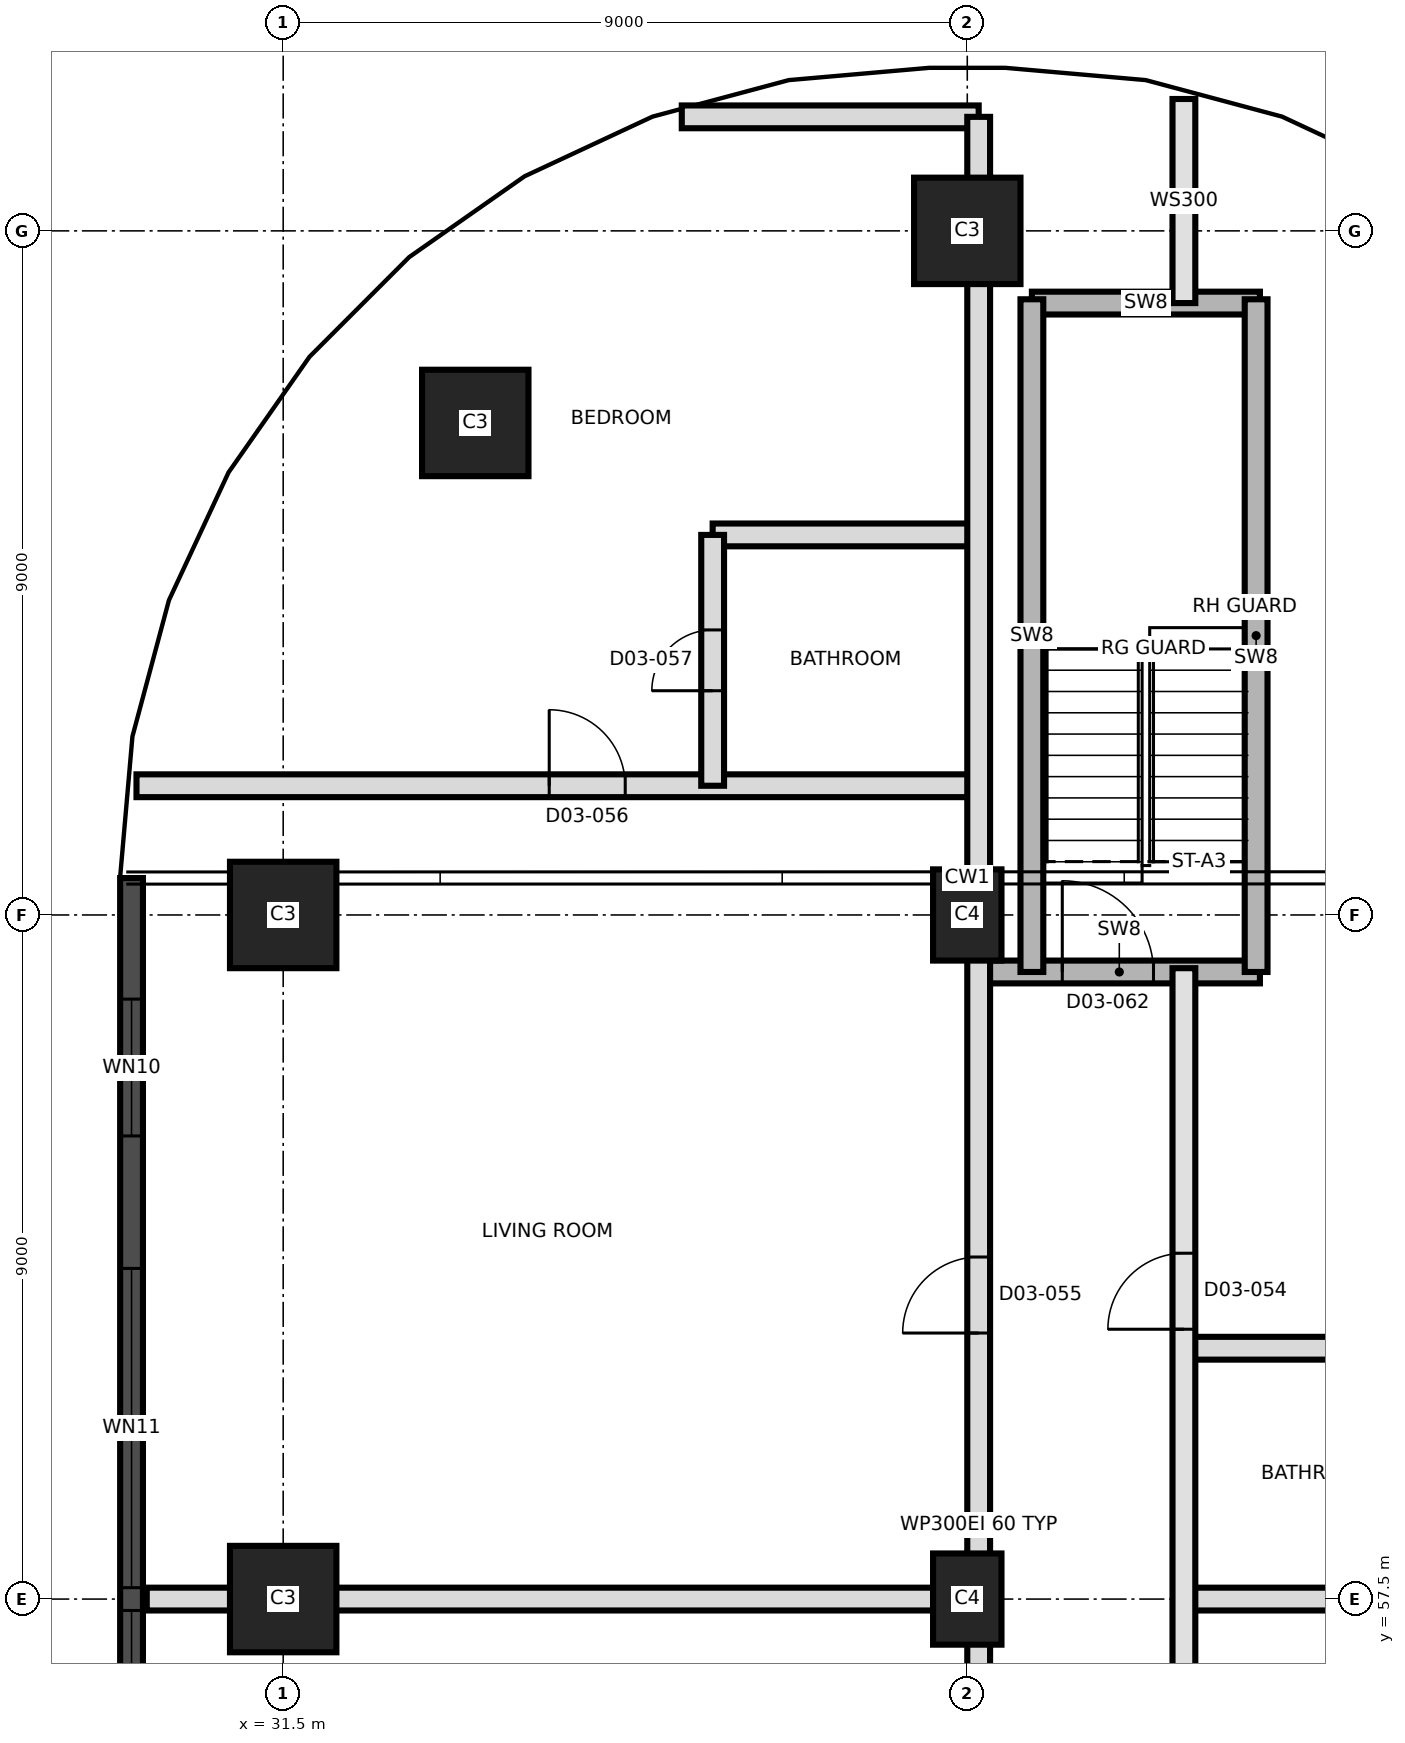
"""IFC4 building model, lengths in metres.
Left out: names, types, materials, properties, quantities, classifications, styles, units other than length and angle.
Written with IfcOpenShell. Run it as: python <this file> out.ifc"""

import sys

from ifc_helpers import new_model, si_unit, direction, frame, frame_2d, origin, origin_2d, place, context, subcontext, project, spatial, rectangle, extrude, element, fill, save


model = new_model("IFC4")
c1 = context("Model", 3, precision=1e-05, world=origin(), true_north=direction((0.0, 1.0)))
c2 = subcontext(c1, "Body", "Model", "MODEL_VIEW")
j1 = project(units=[si_unit("LENGTHUNIT", "METRE"), si_unit("PLANEANGLEUNIT", "RADIAN")], contexts=[c1])
p1 = place(None, origin())
s1 = spatial("IfcSite", under=j1, at=p1, CompositionType="ELEMENT")
p2 = place(p1, origin())
s2 = spatial("IfcBuilding", under=s1, at=p2, CompositionType="ELEMENT")
p3 = place(p2, frame((0.0, 0.0, 55.7)))
s3 = spatial("IfcBuildingStorey", under=s2, at=p3, CompositionType="ELEMENT", Elevation=55.7)
p4 = place(p3, frame((31.5, 57.5, 0.0), z_axis=(0.0, 0.0, 1.0), x_axis=(1.0, 0.0, 0.0)))
e1 = element("IfcColumn", 1, at=p4, inside=s3, PredefinedType="COLUMN", context=c2, shape_type="SweptSolid", body=[
    extrude(rectangle(XDim=1.4, YDim=1.4, at=origin_2d()), origin(), (0.0, 0.0, 1.0), 3.7),
])
p5 = place(p3, frame((40.5, 57.5, 0.0), z_axis=(0.0, 0.0, 1.0), x_axis=(0.0, 1.0, 0.0)))
e2 = element("IfcColumn", 2, at=p5, inside=s3, PredefinedType="COLUMN", context=c2, shape_type="SweptSolid", body=[
    extrude(rectangle(XDim=1.2, YDim=0.9, at=origin_2d()), origin(), (0.0, 0.0, 1.0), 3.7),
])
p6 = place(p3, frame((31.5, 66.5, 0.0), z_axis=(0.0, 0.0, 1.0), x_axis=(1.0, 0.0, 0.0)))
e3 = element("IfcColumn", 3, at=p6, inside=s3, PredefinedType="COLUMN", context=c2, shape_type="SweptSolid", body=[
    extrude(rectangle(XDim=1.4, YDim=1.4, at=origin_2d()), origin(), (0.0, 0.0, 1.0), 3.7),
])
p7 = place(p3, frame((40.5, 66.5, 0.0), z_axis=(0.0, 0.0, 1.0), x_axis=(0.0, 1.0, 0.0)))
e4 = element("IfcColumn", 4, at=p7, inside=s3, PredefinedType="COLUMN", context=c2, shape_type="SweptSolid", body=[
    extrude(rectangle(XDim=1.2, YDim=0.9, at=origin_2d()), origin(), (0.0, 0.0, 1.0), 3.7),
])
for number, where, z_axis, x_axis in (
    (5, (34.027, 72.973, 0.0), (0.0, 0.0, 1.0), (1.0, 0.0, 0.0)),
    (6, (40.5, 75.5, 0.0), (0.0, 0.0, 1.0), (1.0, 0.0, 0.0)),
):
    element("IfcColumn", number, at=place(p3, frame(where, z_axis=z_axis, x_axis=x_axis)), inside=s3, PredefinedType="COLUMN", context=c2, shape_type="SweptSolid", body=[
        extrude(rectangle(XDim=1.4, YDim=1.4, at=origin_2d()), origin(), (0.0, 0.0, 1.0), 3.7),
    ])
p8 = place(p3, frame((29.505, 66.986, 0.0), z_axis=(0.0, 0.0, 1.0), x_axis=(0.0, -1.0, 0.0)))
e7 = element("IfcWall", 7, at=p8, inside=s3, PredefinedType="SOLIDWALL", context=c2, shape_type="SweptSolid", body=[
    extrude(rectangle(XDim=32.976, YDim=0.3, at=frame_2d((16.488, 0.0))), origin(), (0.0, 0.0, 1.0), 3.4),
])
p9 = place(p8, frame((1.593, 0.0, 0.3)))
e8 = element("IfcOpeningElement", 8, at=p9, cuts=e7, PredefinedType="OPENING", context=c2, shape_type="SweptSolid", body=[
    extrude(rectangle(XDim=1.8, YDim=2.4, at=frame_2d((0.9, 1.2))), frame((0.0, 0.16, 0.0), z_axis=(0.0, -1.0, 0.0), x_axis=(1.0, 0.0, 0.0)), (0.0, 0.0, 1.0), 0.32),
])
p10 = place(p8, frame((5.136, 0.0, 0.9)))
e9 = element("IfcOpeningElement", 9, at=p10, cuts=e7, PredefinedType="OPENING", context=c2, shape_type="SweptSolid", body=[
    extrude(rectangle(XDim=4.2, YDim=1.5, at=frame_2d((2.1, 0.75))), frame((0.0, 0.16, 0.0), z_axis=(0.0, -1.0, 0.0), x_axis=(1.0, 0.0, 0.0)), (0.0, 0.0, 1.0), 0.32),
])
p11 = place(p8, frame((9.636, 0.0, 0.9)))
e10 = element("IfcOpeningElement", 10, at=p11, cuts=e7, PredefinedType="OPENING", context=c2, shape_type="SweptSolid", body=[
    extrude(rectangle(XDim=4.2, YDim=1.5, at=frame_2d((2.1, 0.75))), frame((0.0, 0.16, 0.0), z_axis=(0.0, -1.0, 0.0), x_axis=(1.0, 0.0, 0.0)), (0.0, 0.0, 1.0), 0.32),
])
p12 = place(p8, frame((14.136, 0.0, 0.9)))
e11 = element("IfcOpeningElement", 11, at=p12, cuts=e7, PredefinedType="OPENING", context=c2, shape_type="SweptSolid", body=[
    extrude(rectangle(XDim=4.2, YDim=1.5, at=frame_2d((2.1, 0.75))), frame((0.0, 0.16, 0.0), z_axis=(0.0, -1.0, 0.0), x_axis=(1.0, 0.0, 0.0)), (0.0, 0.0, 1.0), 0.32),
])
p13 = place(p8, frame((18.636, 0.0, 0.9)))
e12 = element("IfcOpeningElement", 12, at=p13, cuts=e7, PredefinedType="OPENING", context=c2, shape_type="SweptSolid", body=[
    extrude(rectangle(XDim=4.2, YDim=1.5, at=frame_2d((2.1, 0.75))), frame((0.0, 0.16, 0.0), z_axis=(0.0, -1.0, 0.0), x_axis=(1.0, 0.0, 0.0)), (0.0, 0.0, 1.0), 0.32),
])
p14 = place(p8, frame((23.136, 0.0, 0.9)))
e13 = element("IfcOpeningElement", 13, at=p14, cuts=e7, PredefinedType="OPENING", context=c2, shape_type="SweptSolid", body=[
    extrude(rectangle(XDim=4.2, YDim=1.5, at=frame_2d((2.1, 0.75))), frame((0.0, 0.16, 0.0), z_axis=(0.0, -1.0, 0.0), x_axis=(1.0, 0.0, 0.0)), (0.0, 0.0, 1.0), 0.32),
])
p15 = place(p8, frame((29.331, 0.0, 0.3)))
e14 = element("IfcOpeningElement", 14, at=p15, cuts=e7, PredefinedType="OPENING", context=c2, shape_type="SweptSolid", body=[
    extrude(rectangle(XDim=1.8, YDim=2.4, at=frame_2d((0.9, 1.2))), frame((0.0, 0.16, 0.0), z_axis=(0.0, -1.0, 0.0), x_axis=(1.0, 0.0, 0.0)), (0.0, 0.0, 1.0), 0.32),
])
p16 = place(p3, frame((29.705, 57.5, 0.0), z_axis=(0.0, 0.0, 1.0), x_axis=(1.0, 0.0, 0.0)))
e15 = element("IfcWall", 15, at=p16, inside=s3, PredefinedType="PARTITIONING", context=c2, shape_type="SweptSolid", body=[
    extrude(rectangle(XDim=10.945, YDim=0.3, at=frame_2d((5.472, 0.0))), origin(), (0.0, 0.0, 1.0), 3.4),
])
p17 = place(p3, frame((43.35, 57.5, 0.0), z_axis=(0.0, 0.0, 1.0), x_axis=(1.0, 0.0, 0.0)))
e16 = element("IfcWall", 16, at=p17, inside=s3, PredefinedType="PARTITIONING", context=c2, shape_type="SweptSolid", body=[
    extrude(rectangle(XDim=8.125, YDim=0.3, at=frame_2d((4.062, 0.0))), origin(), (0.0, 0.0, 1.0), 3.4),
])
p18 = place(p3, frame((43.35, 60.8, 0.0), z_axis=(0.0, 0.0, 1.0), x_axis=(1.0, 0.0, 0.0)))
e17 = element("IfcWall", 17, at=p18, inside=s3, PredefinedType="PARTITIONING", context=c2, shape_type="SweptSolid", body=[
    extrude(rectangle(XDim=3.5, YDim=0.3, at=frame_2d((1.75, 0.0))), origin(), (0.0, 0.0, 1.0), 3.4),
])
p19 = place(p3, frame((40.65, 65.75, 0.0), z_axis=(0.0, 0.0, 1.0), x_axis=(1.0, 0.0, 0.0)))
e18 = element("IfcWall", 18, at=p19, inside=s3, PredefinedType="SHEAR", context=c2, shape_type="SweptSolid", body=[
    extrude(rectangle(XDim=3.7, YDim=0.3, at=frame_2d((1.85, 0.0))), origin(), (0.0, 0.0, 1.0), 3.4),
])
p20 = place(p19, frame((1.1, 0.0, 0.0)))
e19 = element("IfcOpeningElement", 19, at=p20, cuts=e18, PredefinedType="OPENING", context=c2, shape_type="SweptSolid", body=[
    extrude(rectangle(XDim=1.2, YDim=2.1, at=frame_2d((0.6, 1.05))), frame((0.0, 0.16, 0.0), z_axis=(0.0, -1.0, 0.0), x_axis=(1.0, 0.0, 0.0)), (0.0, 0.0, 1.0), 0.32),
])
p21 = place(p3, frame((29.57, 68.2, 0.0), z_axis=(0.0, 0.0, 1.0), x_axis=(1.0, 0.0, 0.0)))
e20 = element("IfcWall", 20, at=p21, inside=s3, PredefinedType="PARTITIONING", context=c2, shape_type="SweptSolid", body=[
    extrude(rectangle(XDim=11.08, YDim=0.3, at=frame_2d((5.54, 0.0))), origin(), (0.0, 0.0, 1.0), 3.4),
])
p22 = place(p21, frame((5.43, 0.0, 0.0)))
e21 = element("IfcOpeningElement", 21, at=p22, cuts=e20, PredefinedType="OPENING", context=c2, shape_type="SweptSolid", body=[
    extrude(rectangle(XDim=1.0, YDim=2.1, at=frame_2d((0.5, 1.05))), frame((0.0, 0.16, 0.0), z_axis=(0.0, -1.0, 0.0), x_axis=(1.0, 0.0, 0.0)), (0.0, 0.0, 1.0), 0.32),
])
p23 = place(p3, frame((37.15, 71.5, 0.0), z_axis=(0.0, 0.0, 1.0), x_axis=(1.0, 0.0, 0.0)))
e22 = element("IfcWall", 22, at=p23, inside=s3, PredefinedType="PARTITIONING", context=c2, shape_type="SweptSolid", body=[
    extrude(rectangle(XDim=3.5, YDim=0.3, at=frame_2d((1.75, 0.0))), origin(), (0.0, 0.0, 1.0), 3.4),
])
p24 = place(p3, frame((41.35, 74.55, 0.0), z_axis=(0.0, 0.0, 1.0), x_axis=(1.0, 0.0, 0.0)))
e23 = element("IfcWall", 23, at=p24, inside=s3, PredefinedType="SHEAR", context=c2, shape_type="SweptSolid", body=[
    extrude(rectangle(XDim=3.0, YDim=0.3, at=frame_2d((1.5, 0.0))), origin(), (0.0, 0.0, 1.0), 3.4),
])
p25 = place(p3, frame((36.744, 77.0, 0.0), z_axis=(0.0, 0.0, 1.0), x_axis=(1.0, 0.0, 0.0)))
e24 = element("IfcWall", 24, at=p25, inside=s3, PredefinedType="PARTITIONING", context=c2, shape_type="SweptSolid", body=[
    extrude(rectangle(XDim=3.906, YDim=0.3, at=frame_2d((1.953, 0.0))), origin(), (0.0, 0.0, 1.0), 3.4),
])
p26 = place(p3, frame((37.15, 68.2, 0.0), z_axis=(0.0, 0.0, 1.0), x_axis=(0.0, 1.0, 0.0)))
e25 = element("IfcWall", 25, at=p26, inside=s3, PredefinedType="PARTITIONING", context=c2, shape_type="SweptSolid", body=[
    extrude(rectangle(XDim=3.3, YDim=0.3, at=frame_2d((1.65, 0.0))), origin(), (0.0, 0.0, 1.0), 3.4),
])
p27 = place(p26, frame((1.25, 0.0, 0.0)))
e26 = element("IfcOpeningElement", 26, at=p27, cuts=e25, PredefinedType="OPENING", context=c2, shape_type="SweptSolid", body=[
    extrude(rectangle(XDim=0.8, YDim=2.1, at=frame_2d((0.4, 1.05))), frame((0.0, 0.16, 0.0), z_axis=(0.0, -1.0, 0.0), x_axis=(1.0, 0.0, 0.0)), (0.0, 0.0, 1.0), 0.32),
])
p28 = place(p3, frame((40.65, 39.95, 0.0), z_axis=(0.0, 0.0, 1.0), x_axis=(0.0, 1.0, 0.0)))
e27 = element("IfcWall", 27, at=p28, inside=s3, PredefinedType="PARTITIONING", context=c2, shape_type="SweptSolid", body=[
    extrude(rectangle(XDim=37.05, YDim=0.3, at=frame_2d((18.525, 0.0))), origin(), (0.0, 0.0, 1.0), 3.4),
])
p29 = place(p28, frame((1.9, 0.0, 0.0)))
e28 = element("IfcOpeningElement", 28, at=p29, cuts=e27, PredefinedType="OPENING", context=c2, shape_type="SweptSolid", body=[
    extrude(rectangle(XDim=1.0, YDim=2.4, at=frame_2d((0.5, 1.2))), frame((0.0, 0.16, 0.0), z_axis=(0.0, -1.0, 0.0), x_axis=(1.0, 0.0, 0.0)), (0.0, 0.0, 1.0), 0.32),
])
p30 = place(p28, frame((14.2, 0.0, 0.0)))
e29 = element("IfcOpeningElement", 29, at=p30, cuts=e27, PredefinedType="OPENING", context=c2, shape_type="SweptSolid", body=[
    extrude(rectangle(XDim=1.0, YDim=2.4, at=frame_2d((0.5, 1.2))), frame((0.0, 0.16, 0.0), z_axis=(0.0, -1.0, 0.0), x_axis=(1.0, 0.0, 0.0)), (0.0, 0.0, 1.0), 0.32),
])
p31 = place(p28, frame((21.05, 0.0, 0.0)))
e30 = element("IfcOpeningElement", 30, at=p31, cuts=e27, PredefinedType="OPENING", context=c2, shape_type="SweptSolid", body=[
    extrude(rectangle(XDim=1.0, YDim=2.4, at=frame_2d((0.5, 1.2))), frame((0.0, 0.16, 0.0), z_axis=(0.0, -1.0, 0.0), x_axis=(1.0, 0.0, 0.0)), (0.0, 0.0, 1.0), 0.32),
])
p32 = place(p3, frame((41.35, 65.75, 0.0), z_axis=(0.0, 0.0, 1.0), x_axis=(0.0, 1.0, 0.0)))
e31 = element("IfcWall", 31, at=p32, inside=s3, PredefinedType="SHEAR", context=c2, shape_type="SweptSolid", body=[
    extrude(rectangle(XDim=8.85, YDim=0.3, at=frame_2d((4.425, 0.0))), origin(), (0.0, 0.0, 1.0), 3.4),
])
p33 = place(p3, frame((43.35, 39.95, 0.0), z_axis=(0.0, 0.0, 1.0), x_axis=(0.0, 1.0, 0.0)))
e32 = element("IfcWall", 32, at=p33, inside=s3, PredefinedType="SOLIDWALL", context=c2, shape_type="SweptSolid", body=[
    extrude(rectangle(XDim=25.85, YDim=0.3, at=frame_2d((12.925, 0.0))), origin(), (0.0, 0.0, 1.0), 3.4),
])
p34 = place(p33, frame((0.7, 0.0, 0.0)))
e33 = element("IfcOpeningElement", 33, at=p34, cuts=e32, PredefinedType="OPENING", context=c2, shape_type="SweptSolid", body=[
    extrude(rectangle(XDim=1.0, YDim=2.1, at=frame_2d((0.5, 1.05))), frame((0.0, 0.16, 0.0), z_axis=(0.0, -1.0, 0.0), x_axis=(1.0, 0.0, 0.0)), (0.0, 0.0, 1.0), 0.32),
])
p35 = place(p33, frame((6.55, 0.0, 0.0)))
e34 = element("IfcOpeningElement", 34, at=p35, cuts=e32, PredefinedType="OPENING", context=c2, shape_type="SweptSolid", body=[
    extrude(rectangle(XDim=1.0, YDim=2.1, at=frame_2d((0.5, 1.05))), frame((0.0, 0.16, 0.0), z_axis=(0.0, -1.0, 0.0), x_axis=(1.0, 0.0, 0.0)), (0.0, 0.0, 1.0), 0.32),
])
p36 = place(p33, frame((12.55, 0.0, 0.0)))
e35 = element("IfcOpeningElement", 35, at=p36, cuts=e32, PredefinedType="OPENING", context=c2, shape_type="SweptSolid", body=[
    extrude(rectangle(XDim=1.0, YDim=2.4, at=frame_2d((0.5, 1.2))), frame((0.0, 0.16, 0.0), z_axis=(0.0, -1.0, 0.0), x_axis=(1.0, 0.0, 0.0)), (0.0, 0.0, 1.0), 0.32),
])
p37 = place(p33, frame((21.1, 0.0, 0.0)))
e36 = element("IfcOpeningElement", 36, at=p37, cuts=e32, PredefinedType="OPENING", context=c2, shape_type="SweptSolid", body=[
    extrude(rectangle(XDim=1.0, YDim=2.4, at=frame_2d((0.5, 1.2))), frame((0.0, 0.16, 0.0), z_axis=(0.0, -1.0, 0.0), x_axis=(1.0, 0.0, 0.0)), (0.0, 0.0, 1.0), 0.32),
])
p38 = place(p3, frame((43.35, 74.55, 0.0), z_axis=(0.0, 0.0, 1.0), x_axis=(0.0, 1.0, 0.0)))
e37 = element("IfcWall", 37, at=p38, inside=s3, PredefinedType="SOLIDWALL", context=c2, shape_type="SweptSolid", body=[
    extrude(rectangle(XDim=2.685, YDim=0.3, at=frame_2d((1.343, 0.0))), origin(), (0.0, 0.0, 1.0), 3.4),
])
p39 = place(p3, frame((44.3, 65.75, 0.0), z_axis=(0.0, 0.0, 1.0), x_axis=(0.0, 1.0, 0.0)))
e38 = element("IfcWall", 38, at=p39, inside=s3, PredefinedType="SHEAR", context=c2, shape_type="SweptSolid", body=[
    extrude(rectangle(XDim=8.85, YDim=0.3, at=frame_2d((4.425, 0.0))), origin(), (0.0, 0.0, 1.0), 3.4),
])
p40 = place(p9, origin())
e39 = element("IfcWindow", 39, at=p40, inside=s3, PartitioningType="SINGLE_PANEL", PredefinedType="WINDOW", context=c2, shape_type="SweptSolid", body=[
    extrude(rectangle(XDim=1.8, YDim=2.4, at=frame_2d((0.9, 1.2))), frame((0.0, 0.03, 0.0), z_axis=(0.0, -1.0, 0.0), x_axis=(1.0, 0.0, 0.0)), (0.0, 0.0, 1.0), 0.06),
])
fill(e8, e39)
p41 = place(p10, origin())
e40 = element("IfcWindow", 40, at=p41, inside=s3, PartitioningType="SINGLE_PANEL", PredefinedType="WINDOW", context=c2, shape_type="SweptSolid", body=[
    extrude(rectangle(XDim=4.2, YDim=1.5, at=frame_2d((2.1, 0.75))), frame((0.0, 0.03, 0.0), z_axis=(0.0, -1.0, 0.0), x_axis=(1.0, 0.0, 0.0)), (0.0, 0.0, 1.0), 0.06),
])
fill(e9, e40)
p42 = place(p11, origin())
e41 = element("IfcWindow", 41, at=p42, inside=s3, PartitioningType="SINGLE_PANEL", PredefinedType="WINDOW", context=c2, shape_type="SweptSolid", body=[
    extrude(rectangle(XDim=4.2, YDim=1.5, at=frame_2d((2.1, 0.75))), frame((0.0, 0.03, 0.0), z_axis=(0.0, -1.0, 0.0), x_axis=(1.0, 0.0, 0.0)), (0.0, 0.0, 1.0), 0.06),
])
fill(e10, e41)
p43 = place(p37, origin())
e42 = element("IfcDoor", 42, at=p43, inside=s3, OperationType="SINGLE_SWING_LEFT", PredefinedType="DOOR", context=c2, shape_type="SweptSolid", body=[
    extrude(rectangle(XDim=1.0, YDim=2.4, at=frame_2d((0.5, 1.2))), frame((0.0, 0.025, 0.0), z_axis=(0.0, -1.0, 0.0), x_axis=(1.0, 0.0, 0.0)), (0.0, 0.0, 1.0), 0.05),
])
fill(e36, e42)
p44 = place(p31, origin())
e43 = element("IfcDoor", 43, at=p44, inside=s3, OperationType="SINGLE_SWING_RIGHT", PredefinedType="DOOR", context=c2, shape_type="SweptSolid", body=[
    extrude(rectangle(XDim=1.0, YDim=2.4, at=frame_2d((0.5, 1.2))), frame((0.0, 0.025, 0.0), z_axis=(0.0, -1.0, 0.0), x_axis=(1.0, 0.0, 0.0)), (0.0, 0.0, 1.0), 0.05),
])
fill(e30, e43)
p45 = place(p22, origin())
e44 = element("IfcDoor", 44, at=p45, inside=s3, OperationType="SINGLE_SWING_LEFT", PredefinedType="DOOR", context=c2, shape_type="SweptSolid", body=[
    extrude(rectangle(XDim=1.0, YDim=2.1, at=frame_2d((0.5, 1.05))), frame((0.0, 0.025, 0.0), z_axis=(0.0, -1.0, 0.0), x_axis=(1.0, 0.0, 0.0)), (0.0, 0.0, 1.0), 0.05),
])
fill(e21, e44)
p46 = place(p27, origin())
e45 = element("IfcDoor", 45, at=p46, inside=s3, OperationType="SINGLE_SWING_LEFT", PredefinedType="DOOR", context=c2, shape_type="SweptSolid", body=[
    extrude(rectangle(XDim=0.8, YDim=2.1, at=frame_2d((0.4, 1.05))), frame((0.0, 0.025, 0.0), z_axis=(0.0, -1.0, 0.0), x_axis=(1.0, 0.0, 0.0)), (0.0, 0.0, 1.0), 0.05),
])
fill(e26, e45)
p47 = place(p20, origin())
e46 = element("IfcDoor", 46, at=p47, inside=s3, OperationType="SINGLE_SWING_RIGHT", PredefinedType="DOOR", context=c2, shape_type="SweptSolid", body=[
    extrude(rectangle(XDim=1.2, YDim=2.1, at=frame_2d((0.6, 1.05))), frame((0.0, 0.025, 0.0), z_axis=(0.0, -1.0, 0.0), x_axis=(1.0, 0.0, 0.0)), (0.0, 0.0, 1.0), 0.05),
])
fill(e19, e46)
save(model, sys.argv[1])
